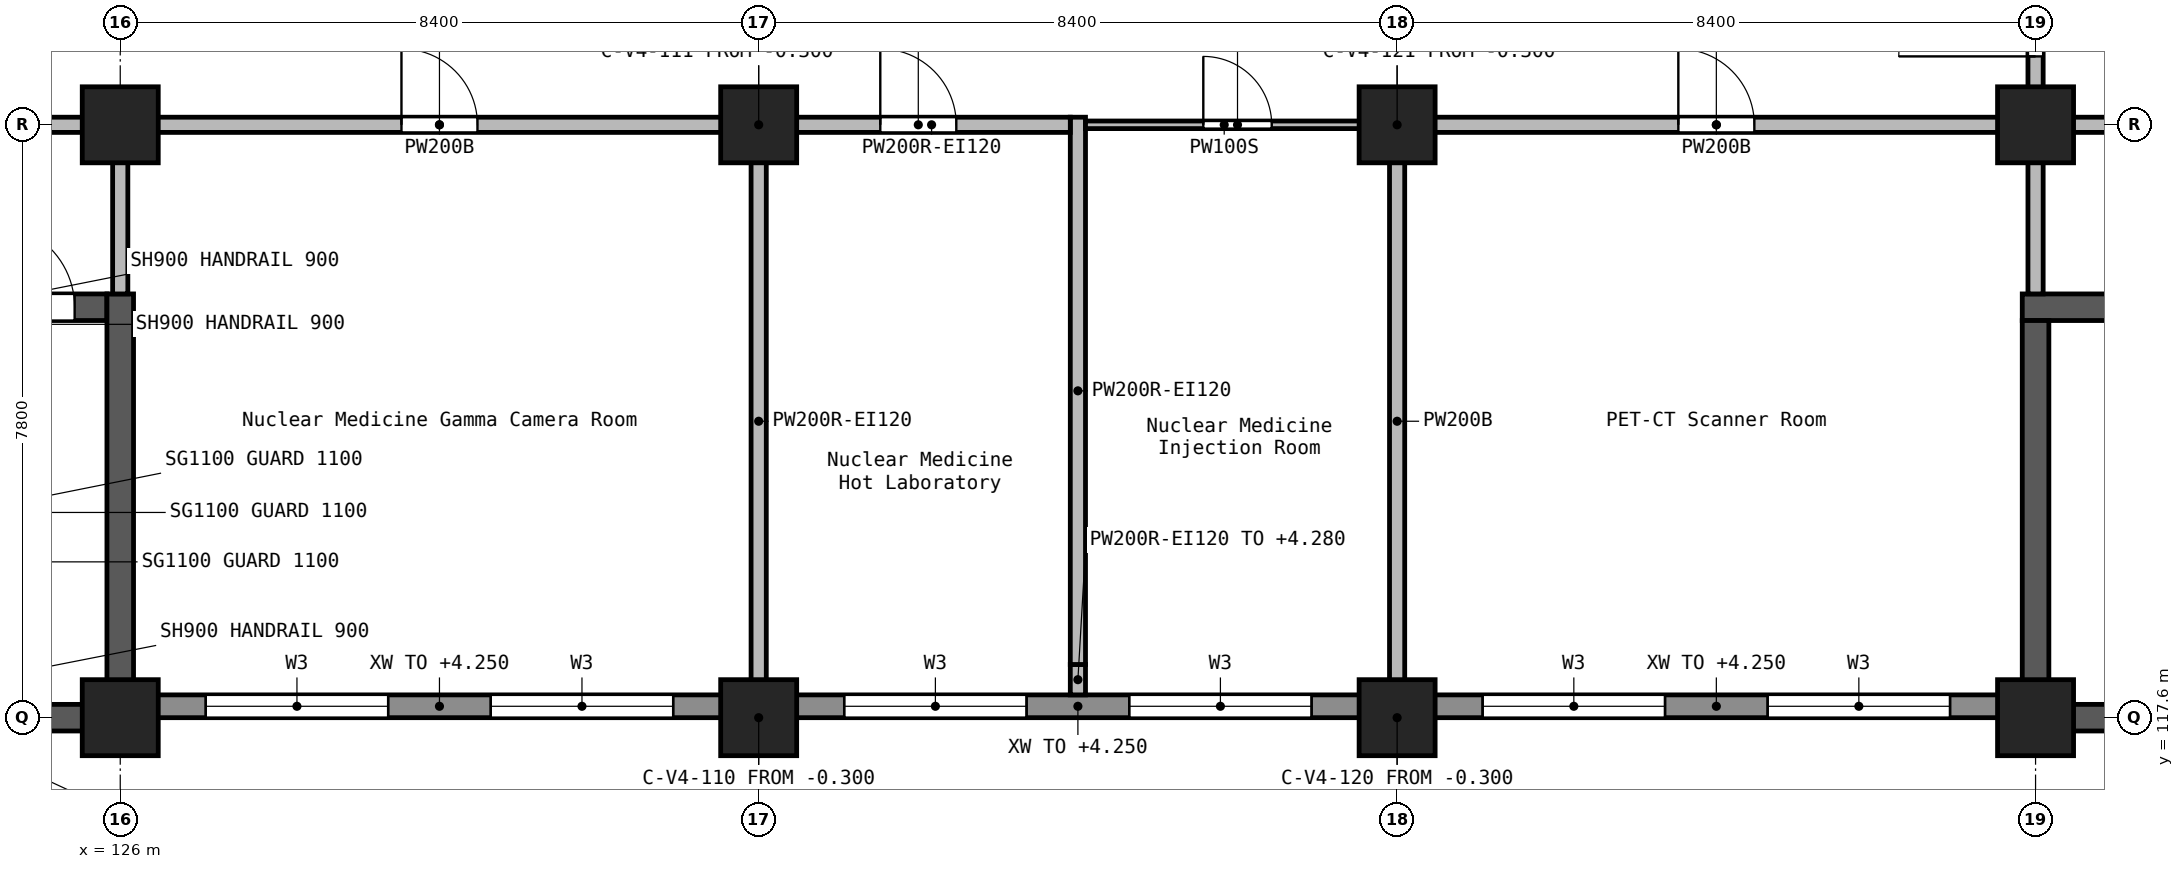
"""IFC4 building model, lengths in metres.
Left out: names, types, materials, properties, quantities, classifications, styles, units other than length and angle.
Written with IfcOpenShell. Run it as: python <this file> out.ifc"""

import sys

from ifc_helpers import new_model, si_unit, direction, frame, frame_2d, origin, origin_2d, place, context, subcontext, project, spatial, rectangle, extrude, element, fill, save


model = new_model("IFC4")
c1 = context("Model", 3, precision=1e-05, world=origin(), true_north=direction((0.0, 1.0)))
c2 = subcontext(c1, "Body", "Model", "MODEL_VIEW")
j1 = project(units=[si_unit("LENGTHUNIT", "METRE"), si_unit("PLANEANGLEUNIT", "RADIAN")], contexts=[c1])
p1 = place(None, origin())
s1 = spatial("IfcSite", under=j1, at=p1, CompositionType="ELEMENT")
p2 = place(p1, origin())
s2 = spatial("IfcBuilding", under=s1, at=p2, CompositionType="ELEMENT")
p3 = place(p2, origin())
s3 = spatial("IfcBuildingStorey", under=s2, at=p3, CompositionType="ELEMENT", Elevation=0.0)
for number, where, z_axis, x_axis in (
    (1, (126.0, 117.6, -0.3), (0.0, 0.0, 1.0), (1.0, 0.0, 0.0)),
    (2, (126.0, 125.4, -0.3), (0.0, 0.0, 1.0), (1.0, 0.0, 0.0)),
    (3, (134.4, 117.6, -0.3), (0.0, 0.0, 1.0), (1.0, 0.0, 0.0)),
    (4, (134.4, 125.4, -0.3), (0.0, 0.0, 1.0), (1.0, 0.0, 0.0)),
    (5, (142.8, 117.6, -0.3), (0.0, 0.0, 1.0), (1.0, 0.0, 0.0)),
    (6, (142.8, 125.4, -0.3), (0.0, 0.0, 1.0), (1.0, 0.0, 0.0)),
    (7, (151.2, 117.6, -0.3), (0.0, 0.0, 1.0), (1.0, 0.0, 0.0)),
    (8, (151.2, 125.4, -0.3), (0.0, 0.0, 1.0), (1.0, 0.0, 0.0)),
):
    element("IfcColumn", number, at=place(p3, frame(where, z_axis=z_axis, x_axis=x_axis)), inside=s3, PredefinedType="COLUMN", context=c2, shape_type="SweptSolid", body=[
        extrude(rectangle(XDim=1.0, YDim=1.0, at=origin_2d()), origin(), (0.0, 0.0, 1.0), 5.7),
    ])
p4 = place(p3, frame((117.425, 123.0, -0.3), z_axis=(0.0, 0.0, 1.0), x_axis=(1.0, 0.0, 0.0)))
e9 = element("IfcWall", 9, at=p4, inside=s3, PredefinedType="SHEAR", context=c2, shape_type="SweptSolid", body=[
    extrude(rectangle(XDim=8.4, YDim=0.35, at=frame_2d((4.2, 0.0))), origin(), (0.0, 0.0, 1.0), 5.7),
])
p5 = place(p4, frame((6.875, 0.0, 0.3)))
e10 = element("IfcOpeningElement", 10, at=p5, cuts=e9, PredefinedType="OPENING", context=c2, shape_type="SweptSolid", body=[
    extrude(rectangle(XDim=1.1, YDim=2.1, at=frame_2d((0.55, 1.05))), frame((0.0, 0.185, 0.0), z_axis=(0.0, -1.0, 0.0), x_axis=(1.0, 0.0, 0.0)), (0.0, 0.0, 1.0), 0.37),
])
p6 = place(p3, frame((117.775, 117.6, -0.3), z_axis=(0.0, 0.0, 1.0), x_axis=(1.0, 0.0, 0.0)))
e11 = element("IfcWall", 11, at=p6, inside=s3, PredefinedType="SHEAR", context=c2, shape_type="SweptSolid", body=[
    extrude(rectangle(XDim=8.05, YDim=0.35, at=frame_2d((4.025, 0.0))), origin(), (0.0, 0.0, 1.0), 5.7),
])
p7 = place(p6, frame((3.325, 0.0, 0.3)))
e12 = element("IfcOpeningElement", 12, at=p7, cuts=e11, PredefinedType="OPENING", context=c2, shape_type="SweptSolid", body=[
    extrude(rectangle(XDim=1.4, YDim=2.1, at=frame_2d((0.7, 1.05))), frame((0.0, 0.185, 0.0), z_axis=(0.0, -1.0, 0.0), x_axis=(1.0, 0.0, 0.0)), (0.0, 0.0, 1.0), 0.37),
])
p8 = place(p3, frame((126.0, 117.425, -0.3), z_axis=(0.0, 0.0, 1.0), x_axis=(0.0, 1.0, 0.0)))
e13 = element("IfcWall", 13, at=p8, inside=s3, PredefinedType="SHEAR", context=c2, shape_type="SweptSolid", body=[
    extrude(rectangle(XDim=5.75, YDim=0.35, at=frame_2d((2.875, 0.0))), origin(), (0.0, 0.0, 1.0), 5.7),
])
p9 = place(p3, frame((151.025, 123.0, -0.3), z_axis=(0.0, 0.0, 1.0), x_axis=(1.0, 0.0, 0.0)))
e14 = element("IfcWall", 14, at=p9, inside=s3, PredefinedType="SHEAR", context=c2, shape_type="SweptSolid", body=[
    extrude(rectangle(XDim=8.4, YDim=0.35, at=frame_2d((4.2, 0.0))), origin(), (0.0, 0.0, 1.0), 5.7),
])
p10 = place(p9, frame((6.875, 0.0, 0.3)))
e15 = element("IfcOpeningElement", 15, at=p10, cuts=e14, PredefinedType="OPENING", context=c2, shape_type="SweptSolid", body=[
    extrude(rectangle(XDim=1.1, YDim=2.1, at=frame_2d((0.55, 1.05))), frame((0.0, 0.185, 0.0), z_axis=(0.0, -1.0, 0.0), x_axis=(1.0, 0.0, 0.0)), (0.0, 0.0, 1.0), 0.37),
])
p11 = place(p3, frame((151.2, 117.425, -0.3), z_axis=(0.0, 0.0, 1.0), x_axis=(0.0, 1.0, 0.0)))
e16 = element("IfcWall", 16, at=p11, inside=s3, PredefinedType="SHEAR", context=c2, shape_type="SweptSolid", body=[
    extrude(rectangle(XDim=5.4, YDim=0.35, at=frame_2d((2.7, 0.0))), origin(), (0.0, 0.0, 1.0), 5.7),
])
p12 = place(p3, frame((151.375, 117.6, -0.3), z_axis=(0.0, 0.0, 1.0), x_axis=(1.0, 0.0, 0.0)))
e17 = element("IfcWall", 17, at=p12, inside=s3, PredefinedType="SHEAR", context=c2, shape_type="SweptSolid", body=[
    extrude(rectangle(XDim=8.05, YDim=0.35, at=frame_2d((4.025, 0.0))), origin(), (0.0, 0.0, 1.0), 5.7),
])
p13 = place(p12, frame((3.325, 0.0, 0.3)))
e18 = element("IfcOpeningElement", 18, at=p13, cuts=e17, PredefinedType="OPENING", context=c2, shape_type="SweptSolid", body=[
    extrude(rectangle(XDim=1.4, YDim=2.1, at=frame_2d((0.7, 1.05))), frame((0.0, 0.185, 0.0), z_axis=(0.0, -1.0, 0.0), x_axis=(1.0, 0.0, 0.0)), (0.0, 0.0, 1.0), 0.37),
])
p14 = place(p3, frame((126.45, 117.75, 0.0), z_axis=(0.0, 0.0, 1.0), x_axis=(1.0, 0.0, 0.0)))
e19 = element("IfcWall", 19, at=p14, inside=s3, PredefinedType="STANDARD", context=c2, shape_type="SweptSolid", body=[
    extrude(rectangle(XDim=7.5, YDim=0.3, at=frame_2d((3.75, 0.0))), origin(), (0.0, 0.0, 1.0), 4.25),
])
p15 = place(p14, frame((0.675, 0.0, 0.9)))
e20 = element("IfcOpeningElement", 20, at=p15, cuts=e19, PredefinedType="OPENING", context=c2, shape_type="SweptSolid", body=[
    extrude(rectangle(XDim=2.4, YDim=1.5, at=frame_2d((1.2, 0.75))), frame((0.0, 0.16, 0.0), z_axis=(0.0, -1.0, 0.0), x_axis=(1.0, 0.0, 0.0)), (0.0, 0.0, 1.0), 0.32),
])
p16 = place(p14, frame((4.425, 0.0, 0.9)))
e21 = element("IfcOpeningElement", 21, at=p16, cuts=e19, PredefinedType="OPENING", context=c2, shape_type="SweptSolid", body=[
    extrude(rectangle(XDim=2.4, YDim=1.5, at=frame_2d((1.2, 0.75))), frame((0.0, 0.16, 0.0), z_axis=(0.0, -1.0, 0.0), x_axis=(1.0, 0.0, 0.0)), (0.0, 0.0, 1.0), 0.32),
])
p17 = place(p3, frame((134.85, 117.75, 0.0), z_axis=(0.0, 0.0, 1.0), x_axis=(1.0, 0.0, 0.0)))
e22 = element("IfcWall", 22, at=p17, inside=s3, PredefinedType="STANDARD", context=c2, shape_type="SweptSolid", body=[
    extrude(rectangle(XDim=7.5, YDim=0.3, at=frame_2d((3.75, 0.0))), origin(), (0.0, 0.0, 1.0), 4.25),
])
p18 = place(p17, frame((0.675, 0.0, 0.9)))
e23 = element("IfcOpeningElement", 23, at=p18, cuts=e22, PredefinedType="OPENING", context=c2, shape_type="SweptSolid", body=[
    extrude(rectangle(XDim=2.4, YDim=1.5, at=frame_2d((1.2, 0.75))), frame((0.0, 0.16, 0.0), z_axis=(0.0, -1.0, 0.0), x_axis=(1.0, 0.0, 0.0)), (0.0, 0.0, 1.0), 0.32),
])
p19 = place(p17, frame((4.425, 0.0, 0.9)))
e24 = element("IfcOpeningElement", 24, at=p19, cuts=e22, PredefinedType="OPENING", context=c2, shape_type="SweptSolid", body=[
    extrude(rectangle(XDim=2.4, YDim=1.5, at=frame_2d((1.2, 0.75))), frame((0.0, 0.16, 0.0), z_axis=(0.0, -1.0, 0.0), x_axis=(1.0, 0.0, 0.0)), (0.0, 0.0, 1.0), 0.32),
])
p20 = place(p3, frame((143.25, 117.75, 0.0), z_axis=(0.0, 0.0, 1.0), x_axis=(1.0, 0.0, 0.0)))
e25 = element("IfcWall", 25, at=p20, inside=s3, PredefinedType="STANDARD", context=c2, shape_type="SweptSolid", body=[
    extrude(rectangle(XDim=7.5, YDim=0.3, at=frame_2d((3.75, 0.0))), origin(), (0.0, 0.0, 1.0), 4.25),
])
p21 = place(p20, frame((0.675, 0.0, 0.9)))
e26 = element("IfcOpeningElement", 26, at=p21, cuts=e25, PredefinedType="OPENING", context=c2, shape_type="SweptSolid", body=[
    extrude(rectangle(XDim=2.4, YDim=1.5, at=frame_2d((1.2, 0.75))), frame((0.0, 0.16, 0.0), z_axis=(0.0, -1.0, 0.0), x_axis=(1.0, 0.0, 0.0)), (0.0, 0.0, 1.0), 0.32),
])
p22 = place(p20, frame((4.425, 0.0, 0.9)))
e27 = element("IfcOpeningElement", 27, at=p22, cuts=e25, PredefinedType="OPENING", context=c2, shape_type="SweptSolid", body=[
    extrude(rectangle(XDim=2.4, YDim=1.5, at=frame_2d((1.2, 0.75))), frame((0.0, 0.16, 0.0), z_axis=(0.0, -1.0, 0.0), x_axis=(1.0, 0.0, 0.0)), (0.0, 0.0, 1.0), 0.32),
])
p23 = place(p3, frame((118.05, 125.4, 0.0), z_axis=(0.0, 0.0, 1.0), x_axis=(1.0, 0.0, 0.0)))
e28 = element("IfcWall", 28, at=p23, inside=s3, PredefinedType="SOLIDWALL", context=c2, shape_type="SweptSolid", body=[
    extrude(rectangle(XDim=7.5, YDim=0.2, at=frame_2d((3.75, 0.0))), origin(), (0.0, 0.0, 1.0), 5.05),
])
p24 = place(p23, frame((3.2, 0.0, 0.0)))
e29 = element("IfcOpeningElement", 29, at=p24, cuts=e28, PredefinedType="OPENING", context=c2, shape_type="SweptSolid", body=[
    extrude(rectangle(XDim=1.1, YDim=2.1, at=frame_2d((0.55, 1.05))), frame((0.0, 0.11, 0.0), z_axis=(0.0, -1.0, 0.0), x_axis=(1.0, 0.0, 0.0)), (0.0, 0.0, 1.0), 0.22),
])
p25 = place(p3, frame((151.2, 123.175, 0.0), z_axis=(0.0, 0.0, 1.0), x_axis=(0.0, 1.0, 0.0)))
e30 = element("IfcWall", 30, at=p25, inside=s3, PredefinedType="SOLIDWALL", context=c2, shape_type="SweptSolid", body=[
    extrude(rectangle(XDim=1.775, YDim=0.2, at=frame_2d((0.887, 0.0))), origin(), (0.0, 0.0, 1.0), 5.05),
])
p26 = place(p3, frame((151.2, 125.85, 0.0), z_axis=(0.0, 0.0, 1.0), x_axis=(0.0, 1.0, 0.0)))
e31 = element("IfcWall", 31, at=p26, inside=s3, PredefinedType="SOLIDWALL", context=c2, shape_type="SweptSolid", body=[
    extrude(rectangle(XDim=2.7, YDim=0.2, at=frame_2d((1.35, 0.0))), origin(), (0.0, 0.0, 1.0), 5.05),
])
p27 = place(p26, frame((0.45, 0.0, 0.0)))
e32 = element("IfcOpeningElement", 32, at=p27, cuts=e31, PredefinedType="OPENING", context=c2, shape_type="SweptSolid", body=[
    extrude(rectangle(XDim=1.8, YDim=2.1, at=frame_2d((0.9, 1.05))), frame((0.0, 0.11, 0.0), z_axis=(0.0, -1.0, 0.0), x_axis=(1.0, 0.0, 0.0)), (0.0, 0.0, 1.0), 0.22),
])
p28 = place(p3, frame((151.65, 125.4, 0.0), z_axis=(0.0, 0.0, 1.0), x_axis=(1.0, 0.0, 0.0)))
e33 = element("IfcWall", 33, at=p28, inside=s3, PredefinedType="SOLIDWALL", context=c2, shape_type="SweptSolid", body=[
    extrude(rectangle(XDim=7.5, YDim=0.2, at=frame_2d((3.75, 0.0))), origin(), (0.0, 0.0, 1.0), 5.05),
])
p29 = place(p28, frame((3.2, 0.0, 0.0)))
e34 = element("IfcOpeningElement", 34, at=p29, cuts=e33, PredefinedType="OPENING", context=c2, shape_type="SweptSolid", body=[
    extrude(rectangle(XDim=1.1, YDim=2.1, at=frame_2d((0.55, 1.05))), frame((0.0, 0.11, 0.0), z_axis=(0.0, -1.0, 0.0), x_axis=(1.0, 0.0, 0.0)), (0.0, 0.0, 1.0), 0.22),
])
p30 = place(p3, frame((134.4, 118.05, 0.0), z_axis=(0.0, 0.0, 1.0), x_axis=(0.0, 1.0, 0.0)))
e35 = element("IfcWall", 35, at=p30, inside=s3, PredefinedType="SOLIDWALL", context=c2, shape_type="SweptSolid", body=[
    extrude(rectangle(XDim=6.9, YDim=0.2, at=frame_2d((3.45, 0.0))), origin(), (0.0, 0.0, 1.0), 5.05),
])
p31 = place(p3, frame((138.6, 117.9, 0.0), z_axis=(0.0, 0.0, 1.0), x_axis=(0.0, 1.0, 0.0)))
e36 = element("IfcWall", 36, at=p31, inside=s3, PredefinedType="SOLIDWALL", context=c2, shape_type="SweptSolid", body=[
    extrude(rectangle(XDim=0.4, YDim=0.2, at=frame_2d((0.2, 0.0))), origin(), (0.0, 0.0, 1.0), 4.28),
])
p32 = place(p3, frame((138.6, 118.3, 0.0), z_axis=(0.0, 0.0, 1.0), x_axis=(0.0, 1.0, 0.0)))
e37 = element("IfcWall", 37, at=p32, inside=s3, PredefinedType="SOLIDWALL", context=c2, shape_type="SweptSolid", body=[
    extrude(rectangle(XDim=7.2, YDim=0.2, at=frame_2d((3.6, 0.0))), origin(), (0.0, 0.0, 1.0), 5.05),
])
p33 = place(p3, frame((134.85, 125.4, 0.0), z_axis=(0.0, 0.0, 1.0), x_axis=(1.0, 0.0, 0.0)))
e38 = element("IfcWall", 38, at=p33, inside=s3, PredefinedType="SOLIDWALL", context=c2, shape_type="SweptSolid", body=[
    extrude(rectangle(XDim=3.65, YDim=0.2, at=frame_2d((1.825, 0.0))), origin(), (0.0, 0.0, 1.0), 5.05),
])
p34 = place(p33, frame((1.15, 0.0, 0.0)))
e39 = element("IfcOpeningElement", 39, at=p34, cuts=e38, PredefinedType="OPENING", context=c2, shape_type="SweptSolid", body=[
    extrude(rectangle(XDim=1.0, YDim=2.1, at=frame_2d((0.5, 1.05))), frame((0.0, 0.11, 0.0), z_axis=(0.0, -1.0, 0.0), x_axis=(1.0, 0.0, 0.0)), (0.0, 0.0, 1.0), 0.22),
])
p35 = place(p3, frame((126.0, 123.175, 0.0), z_axis=(0.0, 0.0, 1.0), x_axis=(0.0, 1.0, 0.0)))
e40 = element("IfcWall", 40, at=p35, inside=s3, PredefinedType="SOLIDWALL", context=c2, shape_type="SweptSolid", body=[
    extrude(rectangle(XDim=1.775, YDim=0.2, at=frame_2d((0.887, 0.0))), origin(), (0.0, 0.0, 1.0), 5.05),
])
p36 = place(p3, frame((126.45, 125.4, 0.0), z_axis=(0.0, 0.0, 1.0), x_axis=(1.0, 0.0, 0.0)))
e41 = element("IfcWall", 41, at=p36, inside=s3, PredefinedType="SOLIDWALL", context=c2, shape_type="SweptSolid", body=[
    extrude(rectangle(XDim=7.5, YDim=0.2, at=frame_2d((3.75, 0.0))), origin(), (0.0, 0.0, 1.0), 5.05),
])
p37 = place(p36, frame((3.25, 0.0, 0.0)))
e42 = element("IfcOpeningElement", 42, at=p37, cuts=e41, PredefinedType="OPENING", context=c2, shape_type="SweptSolid", body=[
    extrude(rectangle(XDim=1.0, YDim=2.1, at=frame_2d((0.5, 1.05))), frame((0.0, 0.11, 0.0), z_axis=(0.0, -1.0, 0.0), x_axis=(1.0, 0.0, 0.0)), (0.0, 0.0, 1.0), 0.22),
])
p38 = place(p3, frame((143.25, 125.4, 0.0), z_axis=(0.0, 0.0, 1.0), x_axis=(1.0, 0.0, 0.0)))
e43 = element("IfcWall", 43, at=p38, inside=s3, PredefinedType="SOLIDWALL", context=c2, shape_type="SweptSolid", body=[
    extrude(rectangle(XDim=7.5, YDim=0.2, at=frame_2d((3.75, 0.0))), origin(), (0.0, 0.0, 1.0), 5.05),
])
p39 = place(p38, frame((3.25, 0.0, 0.0)))
e44 = element("IfcOpeningElement", 44, at=p39, cuts=e43, PredefinedType="OPENING", context=c2, shape_type="SweptSolid", body=[
    extrude(rectangle(XDim=1.0, YDim=2.1, at=frame_2d((0.5, 1.05))), frame((0.0, 0.11, 0.0), z_axis=(0.0, -1.0, 0.0), x_axis=(1.0, 0.0, 0.0)), (0.0, 0.0, 1.0), 0.22),
])
p40 = place(p3, frame((142.8, 118.05, 0.0), z_axis=(0.0, 0.0, 1.0), x_axis=(0.0, 1.0, 0.0)))
e45 = element("IfcWall", 45, at=p40, inside=s3, PredefinedType="SOLIDWALL", context=c2, shape_type="SweptSolid", body=[
    extrude(rectangle(XDim=6.9, YDim=0.2, at=frame_2d((3.45, 0.0))), origin(), (0.0, 0.0, 1.0), 5.05),
])
p41 = place(p3, frame((138.7, 125.4, 0.0), z_axis=(0.0, 0.0, 1.0), x_axis=(1.0, 0.0, 0.0)))
e46 = element("IfcWall", 46, at=p41, inside=s3, PredefinedType="PARTITIONING", context=c2, shape_type="SweptSolid", body=[
    extrude(rectangle(XDim=3.65, YDim=0.1, at=frame_2d((1.825, 0.0))), origin(), (0.0, 0.0, 1.0), 5.05),
])
p42 = place(p41, frame((1.55, 0.0, 0.0)))
e47 = element("IfcOpeningElement", 47, at=p42, cuts=e46, PredefinedType="OPENING", context=c2, shape_type="SweptSolid", body=[
    extrude(rectangle(XDim=0.9, YDim=2.1, at=frame_2d((0.45, 1.05))), frame((0.0, 0.06, 0.0), z_axis=(0.0, -1.0, 0.0), x_axis=(1.0, 0.0, 0.0)), (0.0, 0.0, 1.0), 0.12),
])
p43 = place(p15, origin())
e48 = element("IfcWindow", 48, at=p43, inside=s3, PartitioningType="SINGLE_PANEL", PredefinedType="WINDOW", context=c2, shape_type="SweptSolid", body=[
    extrude(rectangle(XDim=2.4, YDim=1.5, at=frame_2d((1.2, 0.75))), frame((0.0, 0.03, 0.0), z_axis=(0.0, -1.0, 0.0), x_axis=(1.0, 0.0, 0.0)), (0.0, 0.0, 1.0), 0.06),
])
fill(e20, e48)
p44 = place(p16, origin())
e49 = element("IfcWindow", 49, at=p44, inside=s3, PartitioningType="SINGLE_PANEL", PredefinedType="WINDOW", context=c2, shape_type="SweptSolid", body=[
    extrude(rectangle(XDim=2.4, YDim=1.5, at=frame_2d((1.2, 0.75))), frame((0.0, 0.03, 0.0), z_axis=(0.0, -1.0, 0.0), x_axis=(1.0, 0.0, 0.0)), (0.0, 0.0, 1.0), 0.06),
])
fill(e21, e49)
p45 = place(p18, origin())
e50 = element("IfcWindow", 50, at=p45, inside=s3, PartitioningType="SINGLE_PANEL", PredefinedType="WINDOW", context=c2, shape_type="SweptSolid", body=[
    extrude(rectangle(XDim=2.4, YDim=1.5, at=frame_2d((1.2, 0.75))), frame((0.0, 0.03, 0.0), z_axis=(0.0, -1.0, 0.0), x_axis=(1.0, 0.0, 0.0)), (0.0, 0.0, 1.0), 0.06),
])
fill(e23, e50)
p46 = place(p19, origin())
e51 = element("IfcWindow", 51, at=p46, inside=s3, PartitioningType="SINGLE_PANEL", PredefinedType="WINDOW", context=c2, shape_type="SweptSolid", body=[
    extrude(rectangle(XDim=2.4, YDim=1.5, at=frame_2d((1.2, 0.75))), frame((0.0, 0.03, 0.0), z_axis=(0.0, -1.0, 0.0), x_axis=(1.0, 0.0, 0.0)), (0.0, 0.0, 1.0), 0.06),
])
fill(e24, e51)
p47 = place(p21, origin())
e52 = element("IfcWindow", 52, at=p47, inside=s3, PartitioningType="SINGLE_PANEL", PredefinedType="WINDOW", context=c2, shape_type="SweptSolid", body=[
    extrude(rectangle(XDim=2.4, YDim=1.5, at=frame_2d((1.2, 0.75))), frame((0.0, 0.03, 0.0), z_axis=(0.0, -1.0, 0.0), x_axis=(1.0, 0.0, 0.0)), (0.0, 0.0, 1.0), 0.06),
])
fill(e26, e52)
p48 = place(p22, origin())
e53 = element("IfcWindow", 53, at=p48, inside=s3, PartitioningType="SINGLE_PANEL", PredefinedType="WINDOW", context=c2, shape_type="SweptSolid", body=[
    extrude(rectangle(XDim=2.4, YDim=1.5, at=frame_2d((1.2, 0.75))), frame((0.0, 0.03, 0.0), z_axis=(0.0, -1.0, 0.0), x_axis=(1.0, 0.0, 0.0)), (0.0, 0.0, 1.0), 0.06),
])
fill(e27, e53)
p49 = place(p27, origin())
e54 = element("IfcDoor", 54, at=p49, inside=s3, OperationType="DOUBLE_DOOR_SINGLE_SWING", PredefinedType="DOOR", context=c2, shape_type="SweptSolid", body=[
    extrude(rectangle(XDim=1.8, YDim=2.1, at=frame_2d((0.9, 1.05))), frame((0.0, 0.025, 0.0), z_axis=(0.0, -1.0, 0.0), x_axis=(1.0, 0.0, 0.0)), (0.0, 0.0, 1.0), 0.05),
])
fill(e32, e54)
p50 = place(p5, frame((1.1, 0.0, 0.0), z_axis=(0.0, 0.0, 1.0), x_axis=(-1.0, 0.0, 0.0)))
e55 = element("IfcDoor", 55, at=p50, inside=s3, OperationType="SINGLE_SWING_LEFT", PredefinedType="DOOR", context=c2, shape_type="SweptSolid", body=[
    extrude(rectangle(XDim=1.1, YDim=2.1, at=frame_2d((0.55, 1.05))), frame((0.0, 0.025, 0.0), z_axis=(0.0, -1.0, 0.0), x_axis=(1.0, 0.0, 0.0)), (0.0, 0.0, 1.0), 0.05),
])
fill(e10, e55)
p51 = place(p37, frame((1.0, 0.0, 0.0), z_axis=(0.0, 0.0, 1.0), x_axis=(-1.0, 0.0, 0.0)))
e56 = element("IfcDoor", 56, at=p51, inside=s3, OperationType="SINGLE_SWING_RIGHT", PredefinedType="DOOR", context=c2, shape_type="SweptSolid", body=[
    extrude(rectangle(XDim=1.0, YDim=2.1, at=frame_2d((0.5, 1.05))), frame((0.0, 0.025, 0.0), z_axis=(0.0, -1.0, 0.0), x_axis=(1.0, 0.0, 0.0)), (0.0, 0.0, 1.0), 0.05),
])
fill(e42, e56)
p52 = place(p34, frame((1.0, 0.0, 0.0), z_axis=(0.0, 0.0, 1.0), x_axis=(-1.0, 0.0, 0.0)))
e57 = element("IfcDoor", 57, at=p52, inside=s3, OperationType="SINGLE_SWING_RIGHT", PredefinedType="DOOR", context=c2, shape_type="SweptSolid", body=[
    extrude(rectangle(XDim=1.0, YDim=2.1, at=frame_2d((0.5, 1.05))), frame((0.0, 0.025, 0.0), z_axis=(0.0, -1.0, 0.0), x_axis=(1.0, 0.0, 0.0)), (0.0, 0.0, 1.0), 0.05),
])
fill(e39, e57)
p53 = place(p42, frame((0.9, 0.0, 0.0), z_axis=(0.0, 0.0, 1.0), x_axis=(-1.0, 0.0, 0.0)))
e58 = element("IfcDoor", 58, at=p53, inside=s3, OperationType="SINGLE_SWING_LEFT", PredefinedType="DOOR", context=c2, shape_type="SweptSolid", body=[
    extrude(rectangle(XDim=0.9, YDim=2.1, at=frame_2d((0.45, 1.05))), frame((0.0, 0.025, 0.0), z_axis=(0.0, -1.0, 0.0), x_axis=(1.0, 0.0, 0.0)), (0.0, 0.0, 1.0), 0.05),
])
fill(e47, e58)
p54 = place(p39, frame((1.0, 0.0, 0.0), z_axis=(0.0, 0.0, 1.0), x_axis=(-1.0, 0.0, 0.0)))
e59 = element("IfcDoor", 59, at=p54, inside=s3, OperationType="SINGLE_SWING_RIGHT", PredefinedType="DOOR", context=c2, shape_type="SweptSolid", body=[
    extrude(rectangle(XDim=1.0, YDim=2.1, at=frame_2d((0.5, 1.05))), frame((0.0, 0.025, 0.0), z_axis=(0.0, -1.0, 0.0), x_axis=(1.0, 0.0, 0.0)), (0.0, 0.0, 1.0), 0.05),
])
fill(e44, e59)
save(model, sys.argv[1])
